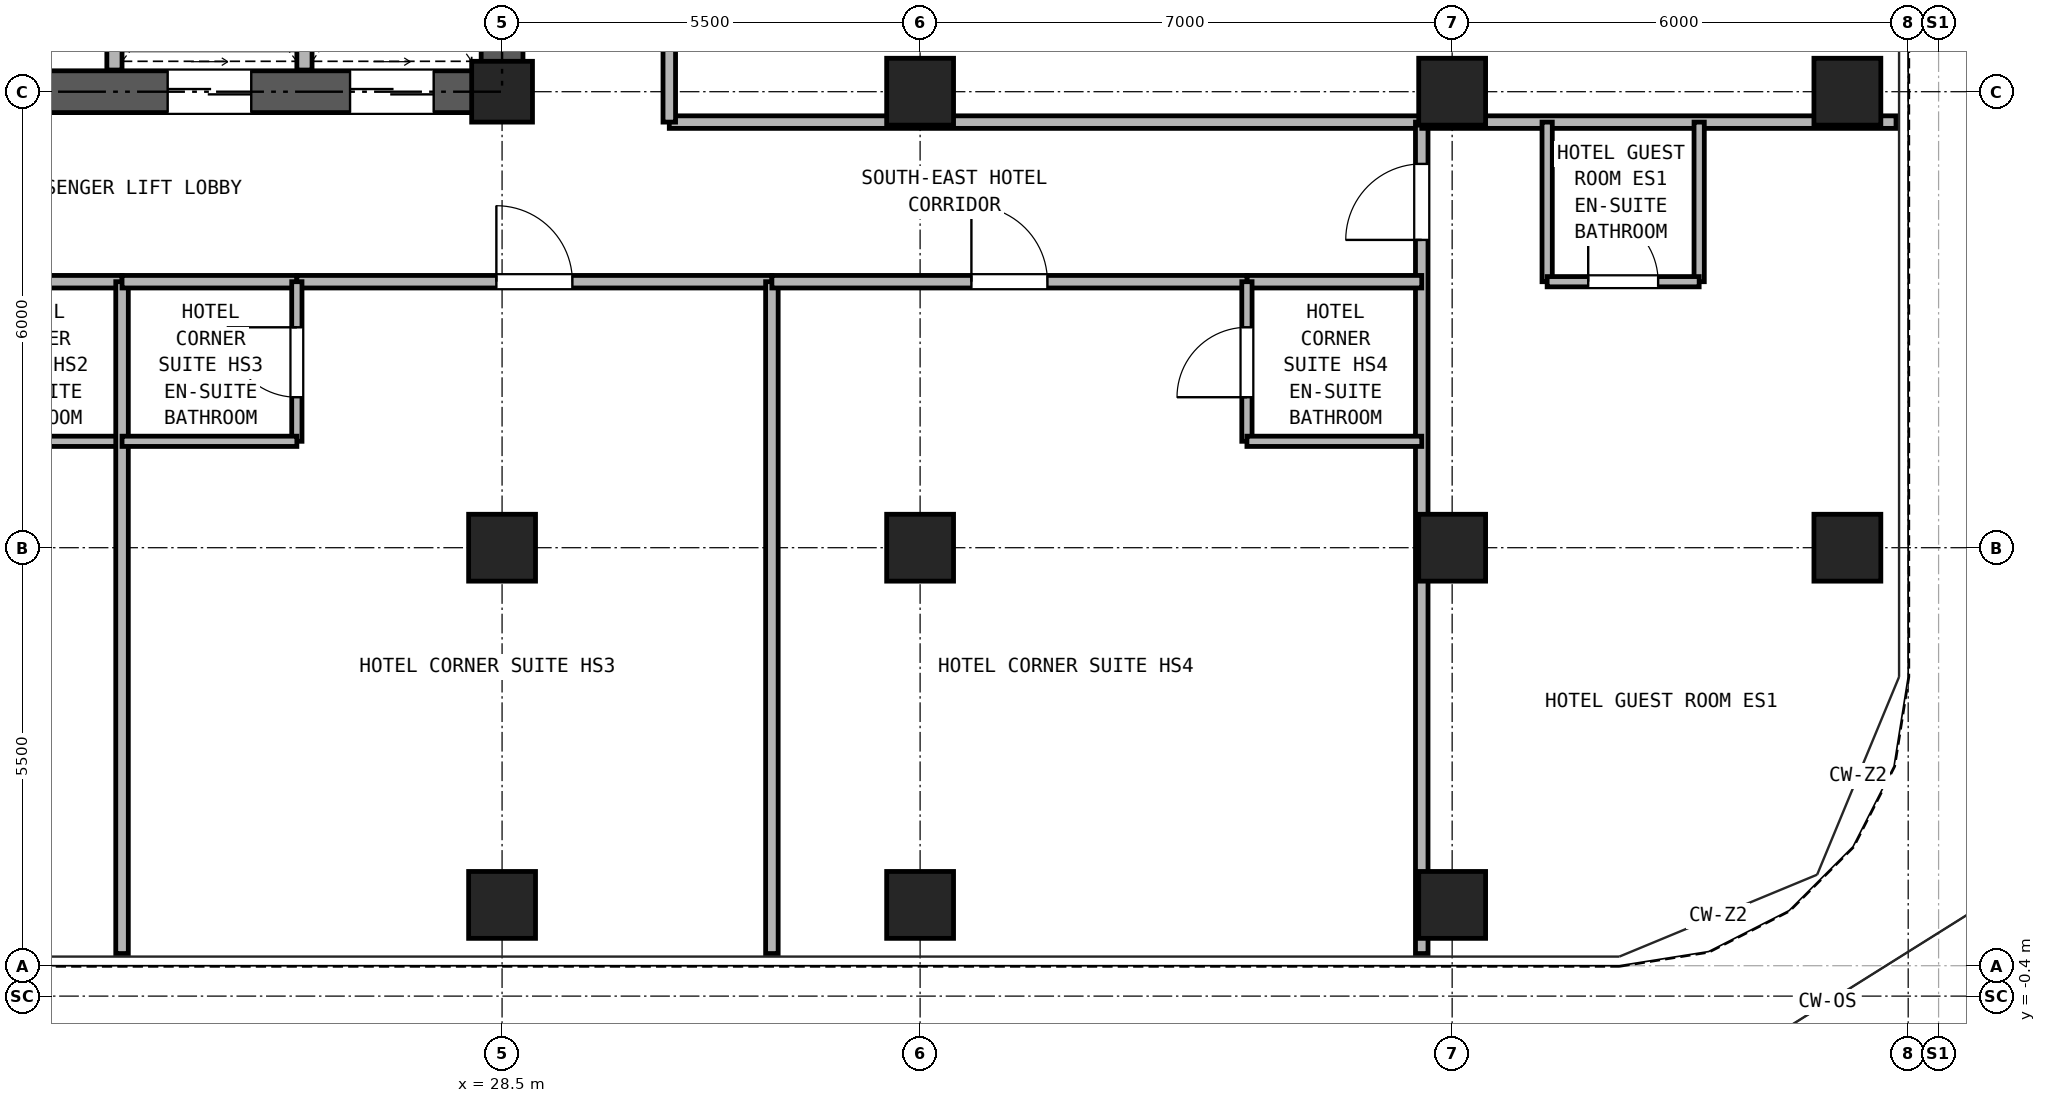
"""IFC4 building model, lengths in metres.
Left out: names, types, materials, properties, quantities, classifications, styles, units other than length and angle.
Written with IfcOpenShell. Run it as: python <this file> out.ifc"""

import sys

from ifc_helpers import new_model, si_unit, direction, frame, frame_2d, origin, origin_2d, place, context, subcontext, project, spatial, rectangle, hollow_rectangle, extrude, source, transform, mapped, element, fill, save


model = new_model("IFC4")
c1 = context("Model", 3, precision=1e-05, world=origin(), true_north=direction((0.0, 1.0)))
c2 = subcontext(c1, "Body", "Model", "MODEL_VIEW")
j1 = project(units=[si_unit("LENGTHUNIT", "METRE"), si_unit("PLANEANGLEUNIT", "RADIAN")], contexts=[c1])
p1 = place(None, origin())
s1 = spatial("IfcSite", under=j1, at=p1, CompositionType="ELEMENT")
p2 = place(p1, origin())
s2 = spatial("IfcBuilding", under=s1, at=p2, CompositionType="ELEMENT")
p3 = place(p2, frame((0.0, 0.0, 105.5)))
s3 = spatial("IfcBuildingStorey", under=s2, at=p3, CompositionType="ELEMENT", Elevation=105.5)
m1 = source(origin(), c2, "Body", "SweptSolid", [
    extrude(hollow_rectangle(XDim=0.88, YDim=0.88, WallThickness=0.05, at=origin_2d()), origin(), (0.0, 0.0, 1.0), 2.95),
])
for number, where, z_axis, x_axis in (
    (1, (28.5, 0.8, 0.0), (0.0, 0.0, 1.0), (1.0, 0.0, 0.0)),
    (2, (34.0, 0.8, 0.0), (0.0, 0.0, 1.0), (1.0, 0.0, 0.0)),
    (3, (41.0, 0.8, 0.0), (0.0, 0.0, 1.0), (1.0, 0.0, 0.0)),
    (4, (46.2, 5.5, 0.0), (0.0, 0.0, 1.0), (1.0, 0.0, 0.0)),
    (5, (46.2, 11.5, 0.0), (0.0, 0.0, 1.0), (1.0, 0.0, 0.0)),
    (6, (28.5, 5.5, 0.0), (0.0, 0.0, 1.0), (1.0, 0.0, 0.0)),
):
    element("IfcColumn", number, at=place(p3, frame(where, z_axis=z_axis, x_axis=x_axis)), inside=s3, PredefinedType="COLUMN", context=c2, shape_type="MappedRepresentation", body=[
        mapped(m1, transform((0.0, 0.0, 0.0), x_axis=(1.0, 0.0, 0.0), y_axis=(0.0, 1.0, 0.0), z_axis=(0.0, 0.0, 1.0), scale=1.0)),
    ])
m2 = source(origin(), c2, "Body", "SweptSolid", [
    extrude(hollow_rectangle(XDim=0.8, YDim=0.8, WallThickness=0.045, at=origin_2d()), origin(), (0.0, 0.0, 1.0), 2.95),
])
p4 = place(p3, frame((28.5, 11.5, 0.0), z_axis=(0.0, 0.0, 1.0), x_axis=(1.0, 0.0, 0.0)))
e7 = element("IfcColumn", 7, at=p4, inside=s3, PredefinedType="COLUMN", context=c2, shape_type="MappedRepresentation", body=[
    mapped(m2, transform((0.0, 0.0, 0.0), x_axis=(1.0, 0.0, 0.0), y_axis=(0.0, 1.0, 0.0), z_axis=(0.0, 0.0, 1.0), scale=1.0)),
])
for number, where, z_axis, x_axis in (
    (8, (34.0, 5.5, 0.0), (0.0, 0.0, 1.0), (1.0, 0.0, 0.0)),
    (9, (34.0, 11.5, 0.0), (0.0, 0.0, 1.0), (1.0, 0.0, 0.0)),
    (10, (41.0, 5.5, 0.0), (0.0, 0.0, 1.0), (1.0, 0.0, 0.0)),
    (11, (41.0, 11.5, 0.0), (0.0, 0.0, 1.0), (1.0, 0.0, 0.0)),
):
    element("IfcColumn", number, at=place(p3, frame(where, z_axis=z_axis, x_axis=x_axis)), inside=s3, PredefinedType="COLUMN", context=c2, shape_type="MappedRepresentation", body=[
        mapped(m1, transform((0.0, 0.0, 0.0), x_axis=(1.0, 0.0, 0.0), y_axis=(0.0, 1.0, 0.0), z_axis=(0.0, 0.0, 1.0), scale=1.0)),
    ])
p5 = place(p3, frame((18.225, 11.5, 0.0), z_axis=(0.0, 0.0, 1.0), x_axis=(1.0, 0.0, 0.0)))
e12 = element("IfcWall", 12, at=p5, inside=s3, PredefinedType="SHEAR", context=c2, shape_type="SweptSolid", body=[
    extrude(rectangle(XDim=10.55, YDim=0.55, at=frame_2d((5.275, 0.0))), origin(), (0.0, 0.0, 1.0), 2.95),
])
p6 = place(p5, frame((2.375, 0.0, 0.0)))
e13 = element("IfcOpeningElement", 13, at=p6, cuts=e12, PredefinedType="OPENING", context=c2, shape_type="SweptSolid", body=[
    extrude(rectangle(XDim=0.95, YDim=2.15, at=frame_2d((0.475, 1.075))), frame((0.0, 0.285, 0.0), z_axis=(0.0, -1.0, 0.0), x_axis=(1.0, 0.0, 0.0)), (0.0, 0.0, 1.0), 0.57),
])
p7 = place(p5, frame((5.875, 0.0, 0.0)))
e14 = element("IfcOpeningElement", 14, at=p7, cuts=e12, PredefinedType="OPENING", context=c2, shape_type="SweptSolid", body=[
    extrude(rectangle(XDim=1.1, YDim=2.25, at=frame_2d((0.55, 1.125))), frame((0.0, 0.285, 0.0), z_axis=(0.0, -1.0, 0.0), x_axis=(1.0, 0.0, 0.0)), (0.0, 0.0, 1.0), 0.57),
])
p8 = place(p5, frame((8.275, 0.0, 0.0)))
e15 = element("IfcOpeningElement", 15, at=p8, cuts=e12, PredefinedType="OPENING", context=c2, shape_type="SweptSolid", body=[
    extrude(rectangle(XDim=1.1, YDim=2.25, at=frame_2d((0.55, 1.125))), frame((0.0, 0.285, 0.0), z_axis=(0.0, -1.0, 0.0), x_axis=(1.0, 0.0, 0.0)), (0.0, 0.0, 1.0), 0.57),
])
p9 = place(p3, frame((28.5, 11.775, 0.0), z_axis=(0.0, 0.0, 1.0), x_axis=(0.0, 1.0, 0.0)))
e16 = element("IfcWall", 16, at=p9, inside=s3, PredefinedType="SHEAR", context=c2, shape_type="SweptSolid", body=[
    extrude(rectangle(XDim=16.7, YDim=0.55, at=frame_2d((8.35, 0.0))), origin(), (0.0, 0.0, 1.0), 2.95),
])
p10 = place(p9, frame((7.375, 0.0, 0.0)))
e17 = element("IfcOpeningElement", 17, at=p10, cuts=e16, PredefinedType="OPENING", context=c2, shape_type="SweptSolid", body=[
    extrude(rectangle(XDim=1.15, YDim=2.2, at=frame_2d((0.575, 1.1))), frame((0.0, 0.285, 0.0), z_axis=(0.0, -1.0, 0.0), x_axis=(1.0, 0.0, 0.0)), (0.0, 0.0, 1.0), 0.57),
])
for number, where, z_axis, x_axis in (
    (18, (23.4, 11.785, 0.0), (0.0, 0.0, 1.0), (0.0, 1.0, 0.0)),
    (19, (25.9, 11.785, 0.0), (0.0, 0.0, 1.0), (0.0, 1.0, 0.0)),
):
    element("IfcWall", number, at=place(p3, frame(where, z_axis=z_axis, x_axis=x_axis)), inside=s3, PredefinedType="PARTITIONING", context=c2, shape_type="SweptSolid", body=[
        extrude(rectangle(XDim=3.215, YDim=0.2, at=frame_2d((1.607, 0.0))), origin(), (0.0, 0.0, 1.0), 2.95),
    ])
p11 = place(p3, frame((30.7, 11.1, 0.0), z_axis=(0.0, 0.0, 1.0), x_axis=(1.0, 0.0, 0.0)))
e20 = element("IfcWall", 20, at=p11, inside=s3, PredefinedType="PARTITIONING", context=c2, shape_type="SweptSolid", body=[
    extrude(rectangle(XDim=9.9, YDim=0.165, at=frame_2d((4.95, 0.0))), origin(), (0.0, 0.0, 1.0), 2.95),
])
p12 = place(p3, frame((30.7, 11.1, 0.0), z_axis=(0.0, 0.0, 1.0), x_axis=(0.0, 1.0, 0.0)))
e21 = element("IfcWall", 21, at=p12, inside=s3, PredefinedType="PARTITIONING", context=c2, shape_type="SweptSolid", body=[
    extrude(rectangle(XDim=18.45, YDim=0.165, at=frame_2d((9.225, 0.0))), origin(), (0.0, 0.0, 1.0), 2.95),
])
p13 = place(p12, frame((4.112, 0.0, 0.0)))
e22 = element("IfcOpeningElement", 22, at=p13, cuts=e21, PredefinedType="OPENING", context=c2, shape_type="SweptSolid", body=[
    extrude(rectangle(XDim=0.95, YDim=2.15, at=frame_2d((0.475, 1.075))), frame((0.0, 0.093, 0.0), z_axis=(0.0, -1.0, 0.0), x_axis=(1.0, 0.0, 0.0)), (0.0, 0.0, 1.0), 0.185),
])
p14 = place(p12, frame((13.338, 0.0, 0.0)))
e23 = element("IfcOpeningElement", 23, at=p14, cuts=e21, PredefinedType="OPENING", context=c2, shape_type="SweptSolid", body=[
    extrude(rectangle(XDim=0.95, YDim=2.15, at=frame_2d((0.475, 1.075))), frame((0.0, 0.093, 0.0), z_axis=(0.0, -1.0, 0.0), x_axis=(1.0, 0.0, 0.0)), (0.0, 0.0, 1.0), 0.185),
])
p15 = place(p3, frame((40.6, 0.16, 0.0), z_axis=(0.0, 0.0, 1.0), x_axis=(0.0, 1.0, 0.0)))
e24 = element("IfcWall", 24, at=p15, inside=s3, PredefinedType="PARTITIONING", context=c2, shape_type="SweptSolid", body=[
    extrude(rectangle(XDim=10.94, YDim=0.165, at=frame_2d((5.47, 0.0))), origin(), (0.0, 0.0, 1.0), 2.95),
])
p16 = place(p15, frame((9.39, 0.0, 0.0)))
e25 = element("IfcOpeningElement", 25, at=p16, cuts=e24, PredefinedType="OPENING", context=c2, shape_type="SweptSolid", body=[
    extrude(rectangle(XDim=1.0, YDim=2.15, at=frame_2d((0.5, 1.075))), frame((0.0, 0.093, 0.0), z_axis=(0.0, -1.0, 0.0), x_axis=(1.0, 0.0, 0.0)), (0.0, 0.0, 1.0), 0.185),
])
p17 = place(p3, frame((40.6, 11.1, 0.0), z_axis=(0.0, 0.0, 1.0), x_axis=(1.0, 0.0, 0.0)))
e26 = element("IfcWall", 26, at=p17, inside=s3, PredefinedType="PARTITIONING", context=c2, shape_type="SweptSolid", body=[
    extrude(rectangle(XDim=6.24, YDim=0.165, at=frame_2d((3.12, 0.0))), origin(), (0.0, 0.0, 1.0), 2.95),
])
for number, where, z_axis, x_axis in (
    (27, (42.25, 9.0, 0.0), (0.0, 0.0, 1.0), (0.0, 1.0, 0.0)),
    (28, (44.25, 9.0, 0.0), (0.0, 0.0, 1.0), (0.0, 1.0, 0.0)),
):
    element("IfcWall", number, at=place(p3, frame(where, z_axis=z_axis, x_axis=x_axis)), inside=s3, PredefinedType="PARTITIONING", context=c2, shape_type="SweptSolid", body=[
        extrude(rectangle(XDim=2.1, YDim=0.135, at=frame_2d((1.05, 0.0))), origin(), (0.0, 0.0, 1.0), 2.95),
    ])
p18 = place(p3, frame((42.25, 9.0, 0.0), z_axis=(0.0, 0.0, 1.0), x_axis=(1.0, 0.0, 0.0)))
e29 = element("IfcWall", 29, at=p18, inside=s3, PredefinedType="PARTITIONING", context=c2, shape_type="SweptSolid", body=[
    extrude(rectangle(XDim=2.0, YDim=0.135, at=frame_2d((1.0, 0.0))), origin(), (0.0, 0.0, 1.0), 2.95),
])
p19 = place(p18, frame((0.54, 0.0, 0.0)))
e30 = element("IfcOpeningElement", 30, at=p19, cuts=e29, PredefinedType="OPENING", context=c2, shape_type="SweptSolid", body=[
    extrude(rectangle(XDim=0.92, YDim=2.1, at=frame_2d((0.46, 1.05))), frame((0.0, 0.077, 0.0), z_axis=(0.0, -1.0, 0.0), x_axis=(1.0, 0.0, 0.0)), (0.0, 0.0, 1.0), 0.155),
])
p20 = place(p3, frame((21.2, 9.0, 0.0), z_axis=(0.0, 0.0, 1.0), x_axis=(1.0, 0.0, 0.0)))
e31 = element("IfcWall", 31, at=p20, inside=s3, PredefinedType="PARTITIONING", context=c2, shape_type="SweptSolid", body=[
    extrude(rectangle(XDim=2.3, YDim=0.165, at=frame_2d((1.15, 0.0))), origin(), (0.0, 0.0, 1.0), 2.95),
])
p21 = place(p3, frame((21.2, 6.9, 0.0), z_axis=(0.0, 0.0, 1.0), x_axis=(1.0, 0.0, 0.0)))
e32 = element("IfcWall", 32, at=p21, inside=s3, PredefinedType="PARTITIONING", context=c2, shape_type="SweptSolid", body=[
    extrude(rectangle(XDim=2.3, YDim=0.135, at=frame_2d((1.15, 0.0))), origin(), (0.0, 0.0, 1.0), 2.95),
])
p22 = place(p3, frame((23.5, 0.16, 0.0), z_axis=(0.0, 0.0, 1.0), x_axis=(0.0, 1.0, 0.0)))
e33 = element("IfcWall", 33, at=p22, inside=s3, PredefinedType="PARTITIONING", context=c2, shape_type="SweptSolid", body=[
    extrude(rectangle(XDim=8.84, YDim=0.165, at=frame_2d((4.42, 0.0))), origin(), (0.0, 0.0, 1.0), 2.95),
])
p23 = place(p3, frame((23.5, 9.0, 0.0), z_axis=(0.0, 0.0, 1.0), x_axis=(1.0, 0.0, 0.0)))
e34 = element("IfcWall", 34, at=p23, inside=s3, PredefinedType="PARTITIONING", context=c2, shape_type="SweptSolid", body=[
    extrude(rectangle(XDim=2.3, YDim=0.165, at=frame_2d((1.15, 0.0))), origin(), (0.0, 0.0, 1.0), 2.95),
])
p24 = place(p3, frame((25.8, 9.0, 0.0), z_axis=(0.0, 0.0, 1.0), x_axis=(1.0, 0.0, 0.0)))
e35 = element("IfcWall", 35, at=p24, inside=s3, PredefinedType="PARTITIONING", context=c2, shape_type="SweptSolid", body=[
    extrude(rectangle(XDim=6.25, YDim=0.165, at=frame_2d((3.125, 0.0))), origin(), (0.0, 0.0, 1.0), 2.95),
])
p25 = place(p24, frame((2.625, 0.0, 0.0)))
e36 = element("IfcOpeningElement", 36, at=p25, cuts=e35, PredefinedType="OPENING", context=c2, shape_type="SweptSolid", body=[
    extrude(rectangle(XDim=1.0, YDim=2.15, at=frame_2d((0.5, 1.075))), frame((0.0, 0.093, 0.0), z_axis=(0.0, -1.0, 0.0), x_axis=(1.0, 0.0, 0.0)), (0.0, 0.0, 1.0), 0.185),
])
p26 = place(p3, frame((25.8, 6.9, 0.0), z_axis=(0.0, 0.0, 1.0), x_axis=(0.0, 1.0, 0.0)))
e37 = element("IfcWall", 37, at=p26, inside=s3, PredefinedType="PARTITIONING", context=c2, shape_type="SweptSolid", body=[
    extrude(rectangle(XDim=2.1, YDim=0.135, at=frame_2d((1.05, 0.0))), origin(), (0.0, 0.0, 1.0), 2.95),
])
p27 = place(p26, frame((0.58, 0.0, 0.0)))
e38 = element("IfcOpeningElement", 38, at=p27, cuts=e37, PredefinedType="OPENING", context=c2, shape_type="SweptSolid", body=[
    extrude(rectangle(XDim=0.92, YDim=2.1, at=frame_2d((0.46, 1.05))), frame((0.0, 0.077, 0.0), z_axis=(0.0, -1.0, 0.0), x_axis=(1.0, 0.0, 0.0)), (0.0, 0.0, 1.0), 0.155),
])
p28 = place(p3, frame((23.5, 6.9, 0.0), z_axis=(0.0, 0.0, 1.0), x_axis=(1.0, 0.0, 0.0)))
e39 = element("IfcWall", 39, at=p28, inside=s3, PredefinedType="PARTITIONING", context=c2, shape_type="SweptSolid", body=[
    extrude(rectangle(XDim=2.3, YDim=0.135, at=frame_2d((1.15, 0.0))), origin(), (0.0, 0.0, 1.0), 2.95),
])
p29 = place(p3, frame((32.05, 0.16, 0.0), z_axis=(0.0, 0.0, 1.0), x_axis=(0.0, 1.0, 0.0)))
e40 = element("IfcWall", 40, at=p29, inside=s3, PredefinedType="PARTITIONING", context=c2, shape_type="SweptSolid", body=[
    extrude(rectangle(XDim=8.84, YDim=0.165, at=frame_2d((4.42, 0.0))), origin(), (0.0, 0.0, 1.0), 2.95),
])
p30 = place(p3, frame((38.3, 9.0, 0.0), z_axis=(0.0, 0.0, 1.0), x_axis=(1.0, 0.0, 0.0)))
e41 = element("IfcWall", 41, at=p30, inside=s3, PredefinedType="PARTITIONING", context=c2, shape_type="SweptSolid", body=[
    extrude(rectangle(XDim=2.3, YDim=0.165, at=frame_2d((1.15, 0.0))), origin(), (0.0, 0.0, 1.0), 2.95),
])
p31 = place(p3, frame((32.05, 9.0, 0.0), z_axis=(0.0, 0.0, 1.0), x_axis=(1.0, 0.0, 0.0)))
e42 = element("IfcWall", 42, at=p31, inside=s3, PredefinedType="PARTITIONING", context=c2, shape_type="SweptSolid", body=[
    extrude(rectangle(XDim=6.25, YDim=0.165, at=frame_2d((3.125, 0.0))), origin(), (0.0, 0.0, 1.0), 2.95),
])
p32 = place(p31, frame((2.625, 0.0, 0.0)))
e43 = element("IfcOpeningElement", 43, at=p32, cuts=e42, PredefinedType="OPENING", context=c2, shape_type="SweptSolid", body=[
    extrude(rectangle(XDim=1.0, YDim=2.15, at=frame_2d((0.5, 1.075))), frame((0.0, 0.093, 0.0), z_axis=(0.0, -1.0, 0.0), x_axis=(1.0, 0.0, 0.0)), (0.0, 0.0, 1.0), 0.185),
])
p33 = place(p3, frame((38.3, 6.9, 0.0), z_axis=(0.0, 0.0, 1.0), x_axis=(0.0, 1.0, 0.0)))
e44 = element("IfcWall", 44, at=p33, inside=s3, PredefinedType="PARTITIONING", context=c2, shape_type="SweptSolid", body=[
    extrude(rectangle(XDim=2.1, YDim=0.135, at=frame_2d((1.05, 0.0))), origin(), (0.0, 0.0, 1.0), 2.95),
])
p34 = place(p33, frame((0.58, 0.0, 0.0)))
e45 = element("IfcOpeningElement", 45, at=p34, cuts=e44, PredefinedType="OPENING", context=c2, shape_type="SweptSolid", body=[
    extrude(rectangle(XDim=0.92, YDim=2.1, at=frame_2d((0.46, 1.05))), frame((0.0, 0.077, 0.0), z_axis=(0.0, -1.0, 0.0), x_axis=(1.0, 0.0, 0.0)), (0.0, 0.0, 1.0), 0.155),
])
p35 = place(p3, frame((38.3, 6.9, 0.0), z_axis=(0.0, 0.0, 1.0), x_axis=(1.0, 0.0, 0.0)))
e46 = element("IfcWall", 46, at=p35, inside=s3, PredefinedType="PARTITIONING", context=c2, shape_type="SweptSolid", body=[
    extrude(rectangle(XDim=2.3, YDim=0.135, at=frame_2d((1.15, 0.0))), origin(), (0.0, 0.0, 1.0), 2.95),
])
p36 = place(p7, frame((1.1, 0.0, 0.0), z_axis=(0.0, 0.0, 1.0), x_axis=(-1.0, 0.0, 0.0)))
e47 = element("IfcDoor", 47, at=p36, inside=s3, OperationType="DOUBLE_DOOR_SLIDING", PredefinedType="DOOR", context=c2, shape_type="SweptSolid", body=[
    extrude(rectangle(XDim=1.1, YDim=2.25, at=frame_2d((0.55, 1.125))), frame((0.0, 0.025, 0.0), z_axis=(0.0, -1.0, 0.0), x_axis=(1.0, 0.0, 0.0)), (0.0, 0.0, 1.0), 0.05),
])
fill(e14, e47)
p37 = place(p8, frame((1.1, 0.0, 0.0), z_axis=(0.0, 0.0, 1.0), x_axis=(-1.0, 0.0, 0.0)))
e48 = element("IfcDoor", 48, at=p37, inside=s3, OperationType="DOUBLE_DOOR_SLIDING", PredefinedType="DOOR", context=c2, shape_type="SweptSolid", body=[
    extrude(rectangle(XDim=1.1, YDim=2.25, at=frame_2d((0.55, 1.125))), frame((0.0, 0.025, 0.0), z_axis=(0.0, -1.0, 0.0), x_axis=(1.0, 0.0, 0.0)), (0.0, 0.0, 1.0), 0.05),
])
fill(e15, e48)
p38 = place(p19, origin())
e49 = element("IfcDoor", 49, at=p38, inside=s3, OperationType="SINGLE_SWING_LEFT", PredefinedType="DOOR", context=c2, shape_type="SweptSolid", body=[
    extrude(rectangle(XDim=0.92, YDim=2.1, at=frame_2d((0.46, 1.05))), frame((0.0, 0.025, 0.0), z_axis=(0.0, -1.0, 0.0), x_axis=(1.0, 0.0, 0.0)), (0.0, 0.0, 1.0), 0.05),
])
fill(e30, e49)
p39 = place(p16, frame((1.0, 0.0, 0.0), z_axis=(0.0, 0.0, 1.0), x_axis=(-1.0, 0.0, 0.0)))
e50 = element("IfcDoor", 50, at=p39, inside=s3, OperationType="SINGLE_SWING_LEFT", PredefinedType="DOOR", context=c2, shape_type="SweptSolid", body=[
    extrude(rectangle(XDim=1.0, YDim=2.15, at=frame_2d((0.5, 1.075))), frame((0.0, 0.025, 0.0), z_axis=(0.0, -1.0, 0.0), x_axis=(1.0, 0.0, 0.0)), (0.0, 0.0, 1.0), 0.05),
])
fill(e25, e50)
p40 = place(p27, frame((0.92, 0.0, 0.0), z_axis=(0.0, 0.0, 1.0), x_axis=(-1.0, 0.0, 0.0)))
e51 = element("IfcDoor", 51, at=p40, inside=s3, OperationType="SINGLE_SWING_RIGHT", PredefinedType="DOOR", context=c2, shape_type="SweptSolid", body=[
    extrude(rectangle(XDim=0.92, YDim=2.1, at=frame_2d((0.46, 1.05))), frame((0.0, 0.025, 0.0), z_axis=(0.0, -1.0, 0.0), x_axis=(1.0, 0.0, 0.0)), (0.0, 0.0, 1.0), 0.05),
])
fill(e38, e51)
p41 = place(p25, frame((1.0, 0.0, 0.0), z_axis=(0.0, 0.0, 1.0), x_axis=(-1.0, 0.0, 0.0)))
e52 = element("IfcDoor", 52, at=p41, inside=s3, OperationType="SINGLE_SWING_LEFT", PredefinedType="DOOR", context=c2, shape_type="SweptSolid", body=[
    extrude(rectangle(XDim=1.0, YDim=2.15, at=frame_2d((0.5, 1.075))), frame((0.0, 0.025, 0.0), z_axis=(0.0, -1.0, 0.0), x_axis=(1.0, 0.0, 0.0)), (0.0, 0.0, 1.0), 0.05),
])
fill(e36, e52)
p42 = place(p34, origin())
e53 = element("IfcDoor", 53, at=p42, inside=s3, OperationType="SINGLE_SWING_LEFT", PredefinedType="DOOR", context=c2, shape_type="SweptSolid", body=[
    extrude(rectangle(XDim=0.92, YDim=2.1, at=frame_2d((0.46, 1.05))), frame((0.0, 0.025, 0.0), z_axis=(0.0, -1.0, 0.0), x_axis=(1.0, 0.0, 0.0)), (0.0, 0.0, 1.0), 0.05),
])
fill(e45, e53)
p43 = place(p32, frame((1.0, 0.0, 0.0), z_axis=(0.0, 0.0, 1.0), x_axis=(-1.0, 0.0, 0.0)))
e54 = element("IfcDoor", 54, at=p43, inside=s3, OperationType="SINGLE_SWING_LEFT", PredefinedType="DOOR", context=c2, shape_type="SweptSolid", body=[
    extrude(rectangle(XDim=1.0, YDim=2.15, at=frame_2d((0.5, 1.075))), frame((0.0, 0.025, 0.0), z_axis=(0.0, -1.0, 0.0), x_axis=(1.0, 0.0, 0.0)), (0.0, 0.0, 1.0), 0.05),
])
fill(e43, e54)
save(model, sys.argv[1])
